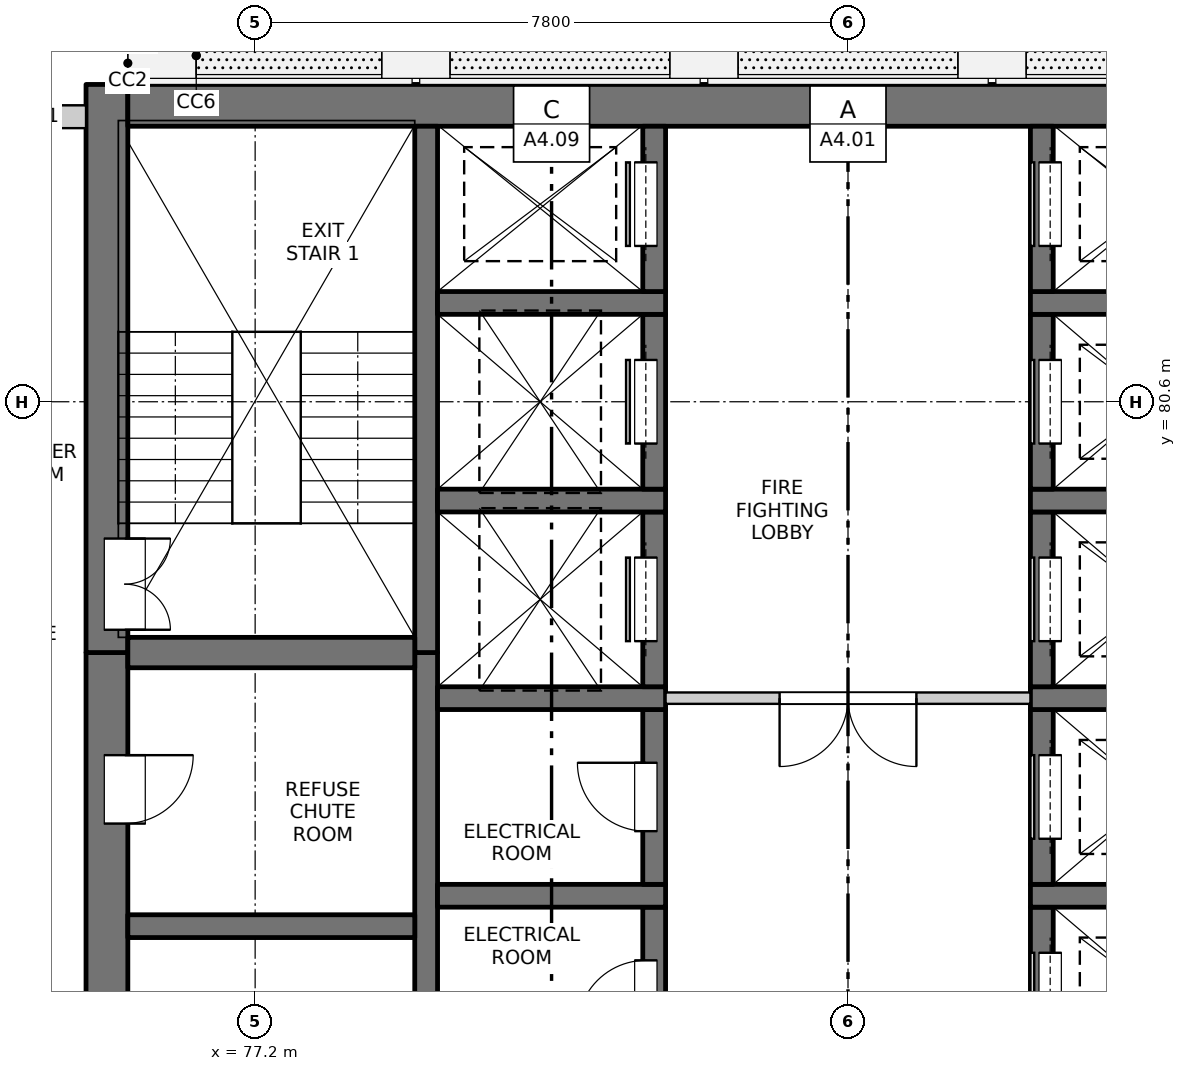
"""IFC4 building model, lengths in metres.
Left out: names, types, materials, properties, quantities, classifications, styles, units other than length and angle.
Written with IfcOpenShell. Run it as: python <this file> out.ifc"""

import sys

from ifc_helpers import new_model, si_unit, direction, frame, frame_2d, origin, place, context, subcontext, project, spatial, rectangle, extrude, element, fill, save


model = new_model("IFC4")
c1 = context("Model", 3, precision=1e-05, world=origin(), true_north=direction((0.0, 1.0)))
c2 = subcontext(c1, "Body", "Model", "MODEL_VIEW")
j1 = project(units=[si_unit("LENGTHUNIT", "METRE"), si_unit("PLANEANGLEUNIT", "RADIAN")], contexts=[c1])
p1 = place(None, origin())
s1 = spatial("IfcSite", under=j1, at=p1, CompositionType="ELEMENT")
p2 = place(p1, origin())
s2 = spatial("IfcBuilding", under=s1, at=p2, CompositionType="ELEMENT")
p3 = place(p2, frame((0.0, 0.0, 155.4)))
s3 = spatial("IfcBuildingStorey", under=s2, at=p3, CompositionType="ELEMENT", Elevation=155.4)
p4 = place(p3, frame((75.25, 54.975, -0.25), z_axis=(0.0, 0.0, 1.0), x_axis=(0.0, 1.0, 0.0)))
e1 = element("IfcWall", 1, at=p4, inside=s3, PredefinedType="SOLIDWALL", context=c2, shape_type="SweptSolid", body=[
    extrude(rectangle(XDim=22.325, YDim=0.55, at=frame_2d((11.163, 0.0))), origin(), (0.0, 0.0, 1.0), 3.4),
])
p5 = place(p4, frame((7.475, 0.0, 0.25)))
e2 = element("IfcOpeningElement", 2, at=p5, cuts=e1, PredefinedType="OPENING", context=c2, shape_type="SweptSolid", body=[
    extrude(rectangle(XDim=0.9, YDim=2.1, at=frame_2d((0.45, 1.05))), frame((0.0, 0.285, 0.0), z_axis=(0.0, -1.0, 0.0), x_axis=(1.0, 0.0, 0.0)), (0.0, 0.0, 1.0), 0.57),
])
p6 = place(p4, frame((13.775, 0.0, 0.25)))
e3 = element("IfcOpeningElement", 3, at=p6, cuts=e1, PredefinedType="OPENING", context=c2, shape_type="SweptSolid", body=[
    extrude(rectangle(XDim=0.9, YDim=2.1, at=frame_2d((0.45, 1.05))), frame((0.0, 0.285, 0.0), z_axis=(0.0, -1.0, 0.0), x_axis=(1.0, 0.0, 0.0)), (0.0, 0.0, 1.0), 0.57),
])
p7 = place(p4, frame((20.075, 0.0, 0.25)))
e4 = element("IfcOpeningElement", 4, at=p7, cuts=e1, PredefinedType="OPENING", context=c2, shape_type="SweptSolid", body=[
    extrude(rectangle(XDim=0.9, YDim=2.1, at=frame_2d((0.45, 1.05))), frame((0.0, 0.285, 0.0), z_axis=(0.0, -1.0, 0.0), x_axis=(1.0, 0.0, 0.0)), (0.0, 0.0, 1.0), 0.57),
])
p8 = place(p3, frame((75.25, 77.3, -0.25), z_axis=(0.0, 0.0, 1.0), x_axis=(0.0, 1.0, 0.0)))
e5 = element("IfcWall", 5, at=p8, inside=s3, PredefinedType="SOLIDWALL", context=c2, shape_type="SweptSolid", body=[
    extrude(rectangle(XDim=7.475, YDim=0.55, at=frame_2d((3.737, 0.0))), origin(), (0.0, 0.0, 1.0), 3.4),
])
p9 = place(p8, frame((0.3, 0.0, 0.25)))
e6 = element("IfcOpeningElement", 6, at=p9, cuts=e5, PredefinedType="OPENING", context=c2, shape_type="SweptSolid", body=[
    extrude(rectangle(XDim=1.2, YDim=2.1, at=frame_2d((0.6, 1.05))), frame((0.0, 0.285, 0.0), z_axis=(0.0, -1.0, 0.0), x_axis=(1.0, 0.0, 0.0)), (0.0, 0.0, 1.0), 0.57),
])
p10 = place(p3, frame((75.525, 84.5, -0.25), z_axis=(0.0, 0.0, 1.0), x_axis=(1.0, 0.0, 0.0)))
e7 = element("IfcWall", 7, at=p10, inside=s3, PredefinedType="SOLIDWALL", context=c2, shape_type="SweptSolid", body=[
    extrude(rectangle(XDim=18.95, YDim=0.55, at=frame_2d((9.475, 0.0))), origin(), (0.0, 0.0, 1.0), 3.4),
])
p11 = place(p3, frame((79.45, 60.95, -0.25), z_axis=(0.0, 0.0, 1.0), x_axis=(0.0, 1.0, 0.0)))
e8 = element("IfcWall", 8, at=p11, inside=s3, PredefinedType="SOLIDWALL", context=c2, shape_type="SweptSolid", body=[
    extrude(rectangle(XDim=16.35, YDim=0.3, at=frame_2d((8.175, 0.0))), origin(), (0.0, 0.0, 1.0), 3.4),
])
p12 = place(p3, frame((79.45, 77.3, -0.25), z_axis=(0.0, 0.0, 1.0), x_axis=(0.0, 1.0, 0.0)))
e9 = element("IfcWall", 9, at=p12, inside=s3, PredefinedType="SOLIDWALL", context=c2, shape_type="SweptSolid", body=[
    extrude(rectangle(XDim=6.925, YDim=0.3, at=frame_2d((3.462, 0.0))), origin(), (0.0, 0.0, 1.0), 3.4),
])
p13 = place(p3, frame((82.45, 71.65, -0.25), z_axis=(0.0, 0.0, 1.0), x_axis=(0.0, 1.0, 0.0)))
e10 = element("IfcWall", 10, at=p13, inside=s3, PredefinedType="SOLIDWALL", context=c2, shape_type="SweptSolid", body=[
    extrude(rectangle(XDim=2.3, YDim=0.3, at=frame_2d((1.15, 0.0))), origin(), (0.0, 0.0, 1.0), 3.4),
])
p14 = place(p13, frame((0.7, 0.0, 0.25)))
e11 = element("IfcOpeningElement", 11, at=p14, cuts=e10, PredefinedType="OPENING", context=c2, shape_type="SweptSolid", body=[
    extrude(rectangle(XDim=0.9, YDim=2.1, at=frame_2d((0.45, 1.05))), frame((0.0, 0.16, 0.0), z_axis=(0.0, -1.0, 0.0), x_axis=(1.0, 0.0, 0.0)), (0.0, 0.0, 1.0), 0.32),
])
p15 = place(p3, frame((79.6, 74.1, -0.25), z_axis=(0.0, 0.0, 1.0), x_axis=(1.0, 0.0, 0.0)))
e12 = element("IfcWall", 12, at=p15, inside=s3, PredefinedType="SOLIDWALL", context=c2, shape_type="SweptSolid", body=[
    extrude(rectangle(XDim=3.0, YDim=0.3, at=frame_2d((1.5, 0.0))), origin(), (0.0, 0.0, 1.0), 3.4),
])
p16 = place(p3, frame((82.45, 74.25, -0.25), z_axis=(0.0, 0.0, 1.0), x_axis=(0.0, 1.0, 0.0)))
e13 = element("IfcWall", 13, at=p16, inside=s3, PredefinedType="SOLIDWALL", context=c2, shape_type="SweptSolid", body=[
    extrude(rectangle(XDim=2.3, YDim=0.3, at=frame_2d((1.15, 0.0))), origin(), (0.0, 0.0, 1.0), 3.4),
])
p17 = place(p16, frame((0.7, 0.0, 0.25)))
e14 = element("IfcOpeningElement", 14, at=p17, cuts=e13, PredefinedType="OPENING", context=c2, shape_type="SweptSolid", body=[
    extrude(rectangle(XDim=0.9, YDim=2.1, at=frame_2d((0.45, 1.05))), frame((0.0, 0.16, 0.0), z_axis=(0.0, -1.0, 0.0), x_axis=(1.0, 0.0, 0.0)), (0.0, 0.0, 1.0), 0.32),
])
p18 = place(p3, frame((79.6, 76.7, -0.25), z_axis=(0.0, 0.0, 1.0), x_axis=(1.0, 0.0, 0.0)))
e15 = element("IfcWall", 15, at=p18, inside=s3, PredefinedType="SOLIDWALL", context=c2, shape_type="SweptSolid", body=[
    extrude(rectangle(XDim=3.0, YDim=0.3, at=frame_2d((1.5, 0.0))), origin(), (0.0, 0.0, 1.0), 3.4),
])
p19 = place(p3, frame((82.45, 76.85, -0.25), z_axis=(0.0, 0.0, 1.0), x_axis=(0.0, 1.0, 0.0)))
e16 = element("IfcWall", 16, at=p19, inside=s3, PredefinedType="SOLIDWALL", context=c2, shape_type="SweptSolid", body=[
    extrude(rectangle(XDim=2.3, YDim=0.3, at=frame_2d((1.15, 0.0))), origin(), (0.0, 0.0, 1.0), 3.4),
])
p20 = place(p19, frame((0.6, 0.0, 0.25)))
e17 = element("IfcOpeningElement", 17, at=p20, cuts=e16, PredefinedType="OPENING", context=c2, shape_type="SweptSolid", body=[
    extrude(rectangle(XDim=1.1, YDim=2.1, at=frame_2d((0.55, 1.05))), frame((0.0, 0.16, 0.0), z_axis=(0.0, -1.0, 0.0), x_axis=(1.0, 0.0, 0.0)), (0.0, 0.0, 1.0), 0.32),
])
p21 = place(p3, frame((79.6, 79.3, -0.25), z_axis=(0.0, 0.0, 1.0), x_axis=(1.0, 0.0, 0.0)))
e18 = element("IfcWall", 18, at=p21, inside=s3, PredefinedType="SOLIDWALL", context=c2, shape_type="SweptSolid", body=[
    extrude(rectangle(XDim=3.0, YDim=0.3, at=frame_2d((1.5, 0.0))), origin(), (0.0, 0.0, 1.0), 3.4),
])
p22 = place(p3, frame((82.45, 79.45, -0.25), z_axis=(0.0, 0.0, 1.0), x_axis=(0.0, 1.0, 0.0)))
e19 = element("IfcWall", 19, at=p22, inside=s3, PredefinedType="SOLIDWALL", context=c2, shape_type="SweptSolid", body=[
    extrude(rectangle(XDim=2.3, YDim=0.3, at=frame_2d((1.15, 0.0))), origin(), (0.0, 0.0, 1.0), 3.4),
])
p23 = place(p22, frame((0.6, 0.0, 0.25)))
e20 = element("IfcOpeningElement", 20, at=p23, cuts=e19, PredefinedType="OPENING", context=c2, shape_type="SweptSolid", body=[
    extrude(rectangle(XDim=1.1, YDim=2.1, at=frame_2d((0.55, 1.05))), frame((0.0, 0.16, 0.0), z_axis=(0.0, -1.0, 0.0), x_axis=(1.0, 0.0, 0.0)), (0.0, 0.0, 1.0), 0.32),
])
p24 = place(p3, frame((79.6, 81.9, -0.25), z_axis=(0.0, 0.0, 1.0), x_axis=(1.0, 0.0, 0.0)))
e21 = element("IfcWall", 21, at=p24, inside=s3, PredefinedType="SOLIDWALL", context=c2, shape_type="SweptSolid", body=[
    extrude(rectangle(XDim=3.0, YDim=0.3, at=frame_2d((1.5, 0.0))), origin(), (0.0, 0.0, 1.0), 3.4),
])
p25 = place(p3, frame((82.45, 82.05, -0.25), z_axis=(0.0, 0.0, 1.0), x_axis=(0.0, 1.0, 0.0)))
e22 = element("IfcWall", 22, at=p25, inside=s3, PredefinedType="SOLIDWALL", context=c2, shape_type="SweptSolid", body=[
    extrude(rectangle(XDim=2.175, YDim=0.3, at=frame_2d((1.087, 0.0))), origin(), (0.0, 0.0, 1.0), 3.4),
])
p26 = place(p25, frame((0.6, 0.0, 0.25)))
e23 = element("IfcOpeningElement", 23, at=p26, cuts=e22, PredefinedType="OPENING", context=c2, shape_type="SweptSolid", body=[
    extrude(rectangle(XDim=1.1, YDim=2.1, at=frame_2d((0.55, 1.05))), frame((0.0, 0.16, 0.0), z_axis=(0.0, -1.0, 0.0), x_axis=(1.0, 0.0, 0.0)), (0.0, 0.0, 1.0), 0.32),
])
p27 = place(p3, frame((87.55, 71.65, -0.25), z_axis=(0.0, 0.0, 1.0), x_axis=(0.0, 1.0, 0.0)))
e24 = element("IfcWall", 24, at=p27, inside=s3, PredefinedType="SOLIDWALL", context=c2, shape_type="SweptSolid", body=[
    extrude(rectangle(XDim=2.3, YDim=0.3, at=frame_2d((1.15, 0.0))), origin(), (0.0, 0.0, 1.0), 3.4),
])
p28 = place(p27, frame((0.6, 0.0, 0.25)))
e25 = element("IfcOpeningElement", 25, at=p28, cuts=e24, PredefinedType="OPENING", context=c2, shape_type="SweptSolid", body=[
    extrude(rectangle(XDim=1.1, YDim=2.1, at=frame_2d((0.55, 1.05))), frame((0.0, 0.16, 0.0), z_axis=(0.0, -1.0, 0.0), x_axis=(1.0, 0.0, 0.0)), (0.0, 0.0, 1.0), 0.32),
])
p29 = place(p3, frame((87.4, 74.1, -0.25), z_axis=(0.0, 0.0, 1.0), x_axis=(1.0, 0.0, 0.0)))
e26 = element("IfcWall", 26, at=p29, inside=s3, PredefinedType="SOLIDWALL", context=c2, shape_type="SweptSolid", body=[
    extrude(rectangle(XDim=3.0, YDim=0.3, at=frame_2d((1.5, 0.0))), origin(), (0.0, 0.0, 1.0), 3.4),
])
p30 = place(p3, frame((87.55, 74.25, -0.25), z_axis=(0.0, 0.0, 1.0), x_axis=(0.0, 1.0, 0.0)))
e27 = element("IfcWall", 27, at=p30, inside=s3, PredefinedType="SOLIDWALL", context=c2, shape_type="SweptSolid", body=[
    extrude(rectangle(XDim=2.3, YDim=0.3, at=frame_2d((1.15, 0.0))), origin(), (0.0, 0.0, 1.0), 3.4),
])
p31 = place(p30, frame((0.6, 0.0, 0.25)))
e28 = element("IfcOpeningElement", 28, at=p31, cuts=e27, PredefinedType="OPENING", context=c2, shape_type="SweptSolid", body=[
    extrude(rectangle(XDim=1.1, YDim=2.1, at=frame_2d((0.55, 1.05))), frame((0.0, 0.16, 0.0), z_axis=(0.0, -1.0, 0.0), x_axis=(1.0, 0.0, 0.0)), (0.0, 0.0, 1.0), 0.32),
])
p32 = place(p3, frame((87.4, 76.7, -0.25), z_axis=(0.0, 0.0, 1.0), x_axis=(1.0, 0.0, 0.0)))
e29 = element("IfcWall", 29, at=p32, inside=s3, PredefinedType="SOLIDWALL", context=c2, shape_type="SweptSolid", body=[
    extrude(rectangle(XDim=3.0, YDim=0.3, at=frame_2d((1.5, 0.0))), origin(), (0.0, 0.0, 1.0), 3.4),
])
p33 = place(p3, frame((87.55, 76.85, -0.25), z_axis=(0.0, 0.0, 1.0), x_axis=(0.0, 1.0, 0.0)))
e30 = element("IfcWall", 30, at=p33, inside=s3, PredefinedType="SOLIDWALL", context=c2, shape_type="SweptSolid", body=[
    extrude(rectangle(XDim=2.3, YDim=0.3, at=frame_2d((1.15, 0.0))), origin(), (0.0, 0.0, 1.0), 3.4),
])
p34 = place(p33, frame((0.6, 0.0, 0.25)))
e31 = element("IfcOpeningElement", 31, at=p34, cuts=e30, PredefinedType="OPENING", context=c2, shape_type="SweptSolid", body=[
    extrude(rectangle(XDim=1.1, YDim=2.1, at=frame_2d((0.55, 1.05))), frame((0.0, 0.16, 0.0), z_axis=(0.0, -1.0, 0.0), x_axis=(1.0, 0.0, 0.0)), (0.0, 0.0, 1.0), 0.32),
])
p35 = place(p3, frame((87.4, 79.3, -0.25), z_axis=(0.0, 0.0, 1.0), x_axis=(1.0, 0.0, 0.0)))
e32 = element("IfcWall", 32, at=p35, inside=s3, PredefinedType="SOLIDWALL", context=c2, shape_type="SweptSolid", body=[
    extrude(rectangle(XDim=3.0, YDim=0.3, at=frame_2d((1.5, 0.0))), origin(), (0.0, 0.0, 1.0), 3.4),
])
p36 = place(p3, frame((87.55, 79.45, -0.25), z_axis=(0.0, 0.0, 1.0), x_axis=(0.0, 1.0, 0.0)))
e33 = element("IfcWall", 33, at=p36, inside=s3, PredefinedType="SOLIDWALL", context=c2, shape_type="SweptSolid", body=[
    extrude(rectangle(XDim=2.3, YDim=0.3, at=frame_2d((1.15, 0.0))), origin(), (0.0, 0.0, 1.0), 3.4),
])
p37 = place(p36, frame((0.6, 0.0, 0.25)))
e34 = element("IfcOpeningElement", 34, at=p37, cuts=e33, PredefinedType="OPENING", context=c2, shape_type="SweptSolid", body=[
    extrude(rectangle(XDim=1.1, YDim=2.1, at=frame_2d((0.55, 1.05))), frame((0.0, 0.16, 0.0), z_axis=(0.0, -1.0, 0.0), x_axis=(1.0, 0.0, 0.0)), (0.0, 0.0, 1.0), 0.32),
])
p38 = place(p3, frame((87.4, 81.9, -0.25), z_axis=(0.0, 0.0, 1.0), x_axis=(1.0, 0.0, 0.0)))
e35 = element("IfcWall", 35, at=p38, inside=s3, PredefinedType="SOLIDWALL", context=c2, shape_type="SweptSolid", body=[
    extrude(rectangle(XDim=3.0, YDim=0.3, at=frame_2d((1.5, 0.0))), origin(), (0.0, 0.0, 1.0), 3.4),
])
p39 = place(p3, frame((87.55, 82.05, -0.25), z_axis=(0.0, 0.0, 1.0), x_axis=(0.0, 1.0, 0.0)))
e36 = element("IfcWall", 36, at=p39, inside=s3, PredefinedType="SOLIDWALL", context=c2, shape_type="SweptSolid", body=[
    extrude(rectangle(XDim=2.175, YDim=0.3, at=frame_2d((1.087, 0.0))), origin(), (0.0, 0.0, 1.0), 3.4),
])
p40 = place(p39, frame((0.6, 0.0, 0.25)))
e37 = element("IfcOpeningElement", 37, at=p40, cuts=e36, PredefinedType="OPENING", context=c2, shape_type="SweptSolid", body=[
    extrude(rectangle(XDim=1.1, YDim=2.1, at=frame_2d((0.55, 1.05))), frame((0.0, 0.16, 0.0), z_axis=(0.0, -1.0, 0.0), x_axis=(1.0, 0.0, 0.0)), (0.0, 0.0, 1.0), 0.32),
])
p41 = place(p3, frame((75.525, 73.7, -0.25), z_axis=(0.0, 0.0, 1.0), x_axis=(1.0, 0.0, 0.0)))
e38 = element("IfcWall", 38, at=p41, inside=s3, PredefinedType="SOLIDWALL", context=c2, shape_type="SweptSolid", body=[
    extrude(rectangle(XDim=3.775, YDim=0.3, at=frame_2d((1.888, 0.0))), origin(), (0.0, 0.0, 1.0), 3.4),
])
p42 = place(p3, frame((75.525, 77.3, -0.25), z_axis=(0.0, 0.0, 1.0), x_axis=(1.0, 0.0, 0.0)))
e39 = element("IfcWall", 39, at=p42, inside=s3, PredefinedType="SOLIDWALL", context=c2, shape_type="SweptSolid", body=[
    extrude(rectangle(XDim=3.775, YDim=0.4, at=frame_2d((1.888, 0.0))), origin(), (0.0, 0.0, 1.0), 3.4),
])
p43 = place(p3, frame((73.675, 84.35, 0.0), z_axis=(0.0, 0.0, 1.0), x_axis=(1.0, 0.0, 0.0)))
e40 = element("IfcWall", 40, at=p43, inside=s3, PredefinedType="SOLIDWALL", context=c2, shape_type="SweptSolid", body=[
    extrude(rectangle(XDim=1.3, YDim=0.3, at=frame_2d((0.65, 0.0))), origin(), (0.0, 0.0, 1.0), 2.7),
])
p44 = place(p3, frame((82.6, 76.7, 0.0), z_axis=(0.0, 0.0, 1.0), x_axis=(1.0, 0.0, 0.0)))
e41 = element("IfcWall", 41, at=p44, inside=s3, PredefinedType="PARTITIONING", context=c2, shape_type="SweptSolid", body=[
    extrude(rectangle(XDim=4.8, YDim=0.15, at=frame_2d((2.4, 0.0))), origin(), (0.0, 0.0, 1.0), 3.15),
])
p45 = place(p44, frame((1.5, 0.0, 0.0)))
e42 = element("IfcOpeningElement", 42, at=p45, cuts=e41, PredefinedType="OPENING", context=c2, shape_type="SweptSolid", body=[
    extrude(rectangle(XDim=1.8, YDim=2.1, at=frame_2d((0.9, 1.05))), frame((0.0, 0.085, 0.0), z_axis=(0.0, -1.0, 0.0), x_axis=(1.0, 0.0, 0.0)), (0.0, 0.0, 1.0), 0.17),
])
p46 = place(p14, origin())
e43 = element("IfcDoor", 43, at=p46, inside=s3, OperationType="SINGLE_SWING_LEFT", PredefinedType="DOOR", context=c2, shape_type="SweptSolid", body=[
    extrude(rectangle(XDim=0.9, YDim=2.1, at=frame_2d((0.45, 1.05))), frame((0.0, 0.135, 0.0), z_axis=(0.0, -1.0, 0.0), x_axis=(1.0, 0.0, 0.0)), (0.0, 0.0, 1.0), 0.05),
])
fill(e11, e43)
p47 = place(p28, origin())
e44 = element("IfcDoor", 44, at=p47, inside=s3, OperationType="SLIDING_TO_LEFT", PredefinedType="DOOR", context=c2, shape_type="SweptSolid", body=[
    extrude(rectangle(XDim=1.1, YDim=2.1, at=frame_2d((0.55, 1.05))), frame((0.0, -0.085, 0.0), z_axis=(0.0, -1.0, 0.0), x_axis=(1.0, 0.0, 0.0)), (0.0, 0.0, 1.0), 0.05),
])
fill(e25, e44)
p48 = place(p17, origin())
e45 = element("IfcDoor", 45, at=p48, inside=s3, OperationType="SINGLE_SWING_RIGHT", PredefinedType="DOOR", context=c2, shape_type="SweptSolid", body=[
    extrude(rectangle(XDim=0.9, YDim=2.1, at=frame_2d((0.45, 1.05))), frame((0.0, 0.135, 0.0), z_axis=(0.0, -1.0, 0.0), x_axis=(1.0, 0.0, 0.0)), (0.0, 0.0, 1.0), 0.05),
])
fill(e14, e45)
p49 = place(p31, origin())
e46 = element("IfcDoor", 46, at=p49, inside=s3, OperationType="SLIDING_TO_LEFT", PredefinedType="DOOR", context=c2, shape_type="SweptSolid", body=[
    extrude(rectangle(XDim=1.1, YDim=2.1, at=frame_2d((0.55, 1.05))), frame((0.0, -0.085, 0.0), z_axis=(0.0, -1.0, 0.0), x_axis=(1.0, 0.0, 0.0)), (0.0, 0.0, 1.0), 0.05),
])
fill(e28, e46)
p50 = place(p7, origin())
e47 = element("IfcDoor", 47, at=p50, inside=s3, OperationType="SINGLE_SWING_LEFT", PredefinedType="DOOR", context=c2, shape_type="SweptSolid", body=[
    extrude(rectangle(XDim=0.9, YDim=2.1, at=frame_2d((0.45, 1.05))), frame((0.0, -0.21, 0.0), z_axis=(0.0, -1.0, 0.0), x_axis=(1.0, 0.0, 0.0)), (0.0, 0.0, 1.0), 0.05),
])
fill(e4, e47)
p51 = place(p45, origin())
e48 = element("IfcDoor", 48, at=p51, inside=s3, OperationType="DOUBLE_DOOR_SINGLE_SWING", PredefinedType="DOOR", context=c2, shape_type="SweptSolid", body=[
    extrude(rectangle(XDim=1.8, YDim=2.1, at=frame_2d((0.9, 1.05))), frame((0.0, 0.025, 0.0), z_axis=(0.0, -1.0, 0.0), x_axis=(1.0, 0.0, 0.0)), (0.0, 0.0, 1.0), 0.05),
])
fill(e42, e48)
p52 = place(p20, origin())
e49 = element("IfcDoor", 49, at=p52, inside=s3, OperationType="SLIDING_TO_LEFT", PredefinedType="DOOR", context=c2, shape_type="SweptSolid", body=[
    extrude(rectangle(XDim=1.1, YDim=2.1, at=frame_2d((0.55, 1.05))), frame((0.0, 0.135, 0.0), z_axis=(0.0, -1.0, 0.0), x_axis=(1.0, 0.0, 0.0)), (0.0, 0.0, 1.0), 0.05),
])
fill(e17, e49)
p53 = place(p34, origin())
e50 = element("IfcDoor", 50, at=p53, inside=s3, OperationType="SLIDING_TO_LEFT", PredefinedType="DOOR", context=c2, shape_type="SweptSolid", body=[
    extrude(rectangle(XDim=1.1, YDim=2.1, at=frame_2d((0.55, 1.05))), frame((0.0, -0.085, 0.0), z_axis=(0.0, -1.0, 0.0), x_axis=(1.0, 0.0, 0.0)), (0.0, 0.0, 1.0), 0.05),
])
fill(e31, e50)
p54 = place(p9, origin())
e51 = element("IfcDoor", 51, at=p54, inside=s3, OperationType="DOUBLE_DOOR_SINGLE_SWING", PredefinedType="DOOR", context=c2, shape_type="SweptSolid", body=[
    extrude(rectangle(XDim=1.2, YDim=2.1, at=frame_2d((0.6, 1.05))), frame((0.0, -0.21, 0.0), z_axis=(0.0, -1.0, 0.0), x_axis=(1.0, 0.0, 0.0)), (0.0, 0.0, 1.0), 0.05),
])
fill(e6, e51)
p55 = place(p23, origin())
e52 = element("IfcDoor", 52, at=p55, inside=s3, OperationType="SLIDING_TO_LEFT", PredefinedType="DOOR", context=c2, shape_type="SweptSolid", body=[
    extrude(rectangle(XDim=1.1, YDim=2.1, at=frame_2d((0.55, 1.05))), frame((0.0, 0.135, 0.0), z_axis=(0.0, -1.0, 0.0), x_axis=(1.0, 0.0, 0.0)), (0.0, 0.0, 1.0), 0.05),
])
fill(e20, e52)
p56 = place(p37, origin())
e53 = element("IfcDoor", 53, at=p56, inside=s3, OperationType="SLIDING_TO_RIGHT", PredefinedType="DOOR", context=c2, shape_type="SweptSolid", body=[
    extrude(rectangle(XDim=1.1, YDim=2.1, at=frame_2d((0.55, 1.05))), frame((0.0, -0.085, 0.0), z_axis=(0.0, -1.0, 0.0), x_axis=(1.0, 0.0, 0.0)), (0.0, 0.0, 1.0), 0.05),
])
fill(e34, e53)
p57 = place(p26, origin())
e54 = element("IfcDoor", 54, at=p57, inside=s3, OperationType="SLIDING_TO_RIGHT", PredefinedType="DOOR", context=c2, shape_type="SweptSolid", body=[
    extrude(rectangle(XDim=1.1, YDim=2.1, at=frame_2d((0.55, 1.05))), frame((0.0, 0.135, 0.0), z_axis=(0.0, -1.0, 0.0), x_axis=(1.0, 0.0, 0.0)), (0.0, 0.0, 1.0), 0.05),
])
fill(e23, e54)
p58 = place(p40, origin())
e55 = element("IfcDoor", 55, at=p58, inside=s3, OperationType="SLIDING_TO_RIGHT", PredefinedType="DOOR", context=c2, shape_type="SweptSolid", body=[
    extrude(rectangle(XDim=1.1, YDim=2.1, at=frame_2d((0.55, 1.05))), frame((0.0, -0.085, 0.0), z_axis=(0.0, -1.0, 0.0), x_axis=(1.0, 0.0, 0.0)), (0.0, 0.0, 1.0), 0.05),
])
fill(e37, e55)
save(model, sys.argv[1])
